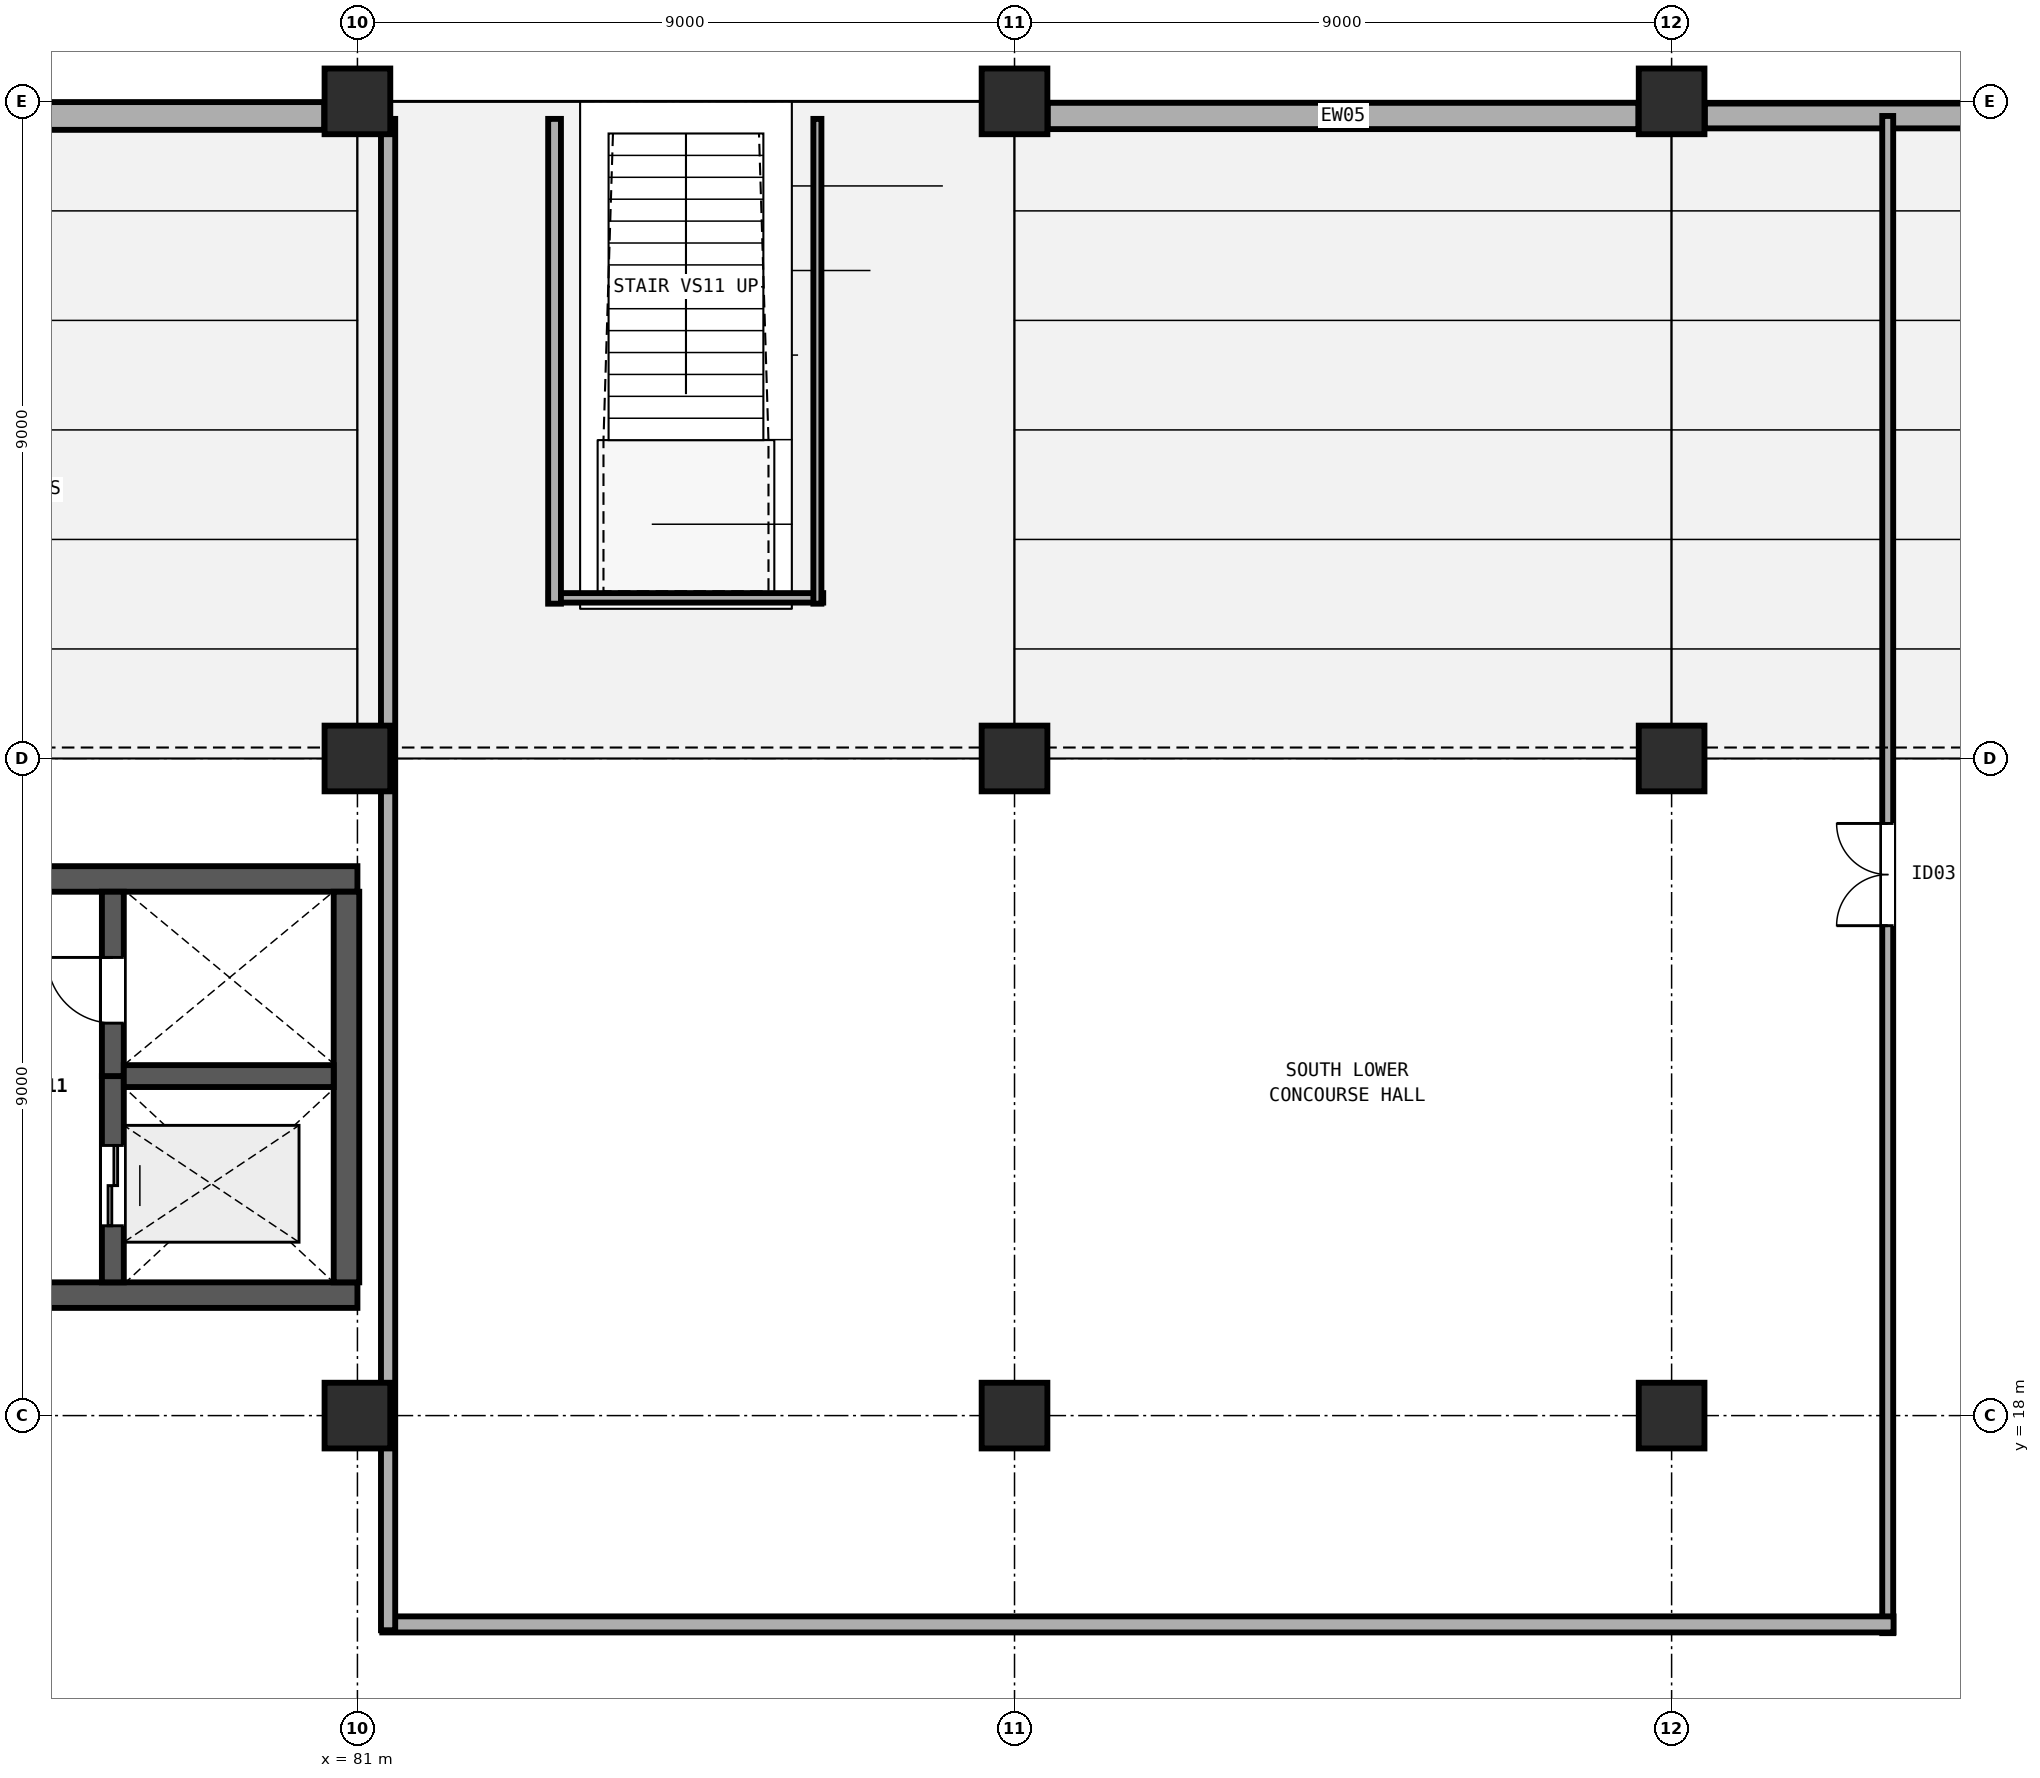
"""IFC4 building model, lengths in metres.
Left out: names, types, materials, properties, quantities, classifications, styles, units other than length and angle.
Written with IfcOpenShell. Run it as: python <this file> out.ifc"""

import sys

from ifc_helpers import new_model, si_unit, direction, frame, frame_2d, origin, origin_2d, place, context, subcontext, project, spatial, rectangle, extrude, element, fill, save


model = new_model("IFC4")
c1 = context("Model", 3, precision=1e-05, world=origin(), true_north=direction((0.0, 1.0)))
c2 = subcontext(c1, "Body", "Model", "MODEL_VIEW")
j1 = project(units=[si_unit("LENGTHUNIT", "METRE"), si_unit("PLANEANGLEUNIT", "RADIAN")], contexts=[c1])
p1 = place(None, origin())
s1 = spatial("IfcSite", under=j1, at=p1, CompositionType="ELEMENT")
p2 = place(p1, origin())
s2 = spatial("IfcBuilding", under=s1, at=p2, CompositionType="ELEMENT")
p3 = place(p2, frame((0.0, 0.0, 4.8)))
s3 = spatial("IfcBuildingStorey", under=s2, at=p3, CompositionType="ELEMENT", Elevation=4.8)
for number, where, z_axis, x_axis in (
    (1, (81.0, 18.0, 0.0), (0.0, 0.0, 1.0), (1.0, 0.0, 0.0)),
    (2, (81.0, 27.0, 0.0), (0.0, 0.0, 1.0), (1.0, 0.0, 0.0)),
    (3, (81.0, 36.0, 0.0), (0.0, 0.0, 1.0), (1.0, 0.0, 0.0)),
    (4, (90.0, 18.0, 0.0), (0.0, 0.0, 1.0), (1.0, 0.0, 0.0)),
    (5, (90.0, 27.0, 0.0), (0.0, 0.0, 1.0), (1.0, 0.0, 0.0)),
    (6, (90.0, 36.0, 0.0), (0.0, 0.0, 1.0), (1.0, 0.0, 0.0)),
    (7, (99.0, 18.0, 0.0), (0.0, 0.0, 1.0), (1.0, 0.0, 0.0)),
    (8, (99.0, 27.0, 0.0), (0.0, 0.0, 1.0), (1.0, 0.0, 0.0)),
    (9, (99.0, 36.0, 0.0), (0.0, 0.0, 1.0), (1.0, 0.0, 0.0)),
):
    element("IfcColumn", number, at=place(p3, frame(where, z_axis=z_axis, x_axis=x_axis)), inside=s3, PredefinedType="COLUMN", context=c2, shape_type="SweptSolid", body=[
        extrude(rectangle(XDim=0.9, YDim=0.9, at=origin_2d()), origin(), (0.0, 0.0, 1.0), 4.8),
    ])
p4 = place(p3, frame((63.0, 19.65, 0.0), z_axis=(0.0, 0.0, 1.0), x_axis=(1.0, 0.0, 0.0)))
e10 = element("IfcWall", 10, at=p4, inside=s3, PredefinedType="SHEAR", context=c2, shape_type="SweptSolid", body=[
    extrude(rectangle(XDim=18.0, YDim=0.35, at=frame_2d((9.0, 0.0))), origin(), (0.0, 0.0, 1.0), 4.52),
])
p5 = place(p4, frame((11.4, 0.0, 0.0)))
e11 = element("IfcOpeningElement", 11, at=p5, cuts=e10, PredefinedType="OPENING", context=c2, shape_type="SweptSolid", body=[
    extrude(rectangle(XDim=1.9, YDim=2.25, at=frame_2d((0.95, 1.125))), frame((0.0, 0.185, 0.0), z_axis=(0.0, -1.0, 0.0), x_axis=(1.0, 0.0, 0.0)), (0.0, 0.0, 1.0), 0.37),
])
p6 = place(p3, frame((81.0, 25.35, 0.0), z_axis=(0.0, 0.0, 1.0), x_axis=(-1.0, 0.0, 0.0)))
e12 = element("IfcWall", 12, at=p6, inside=s3, PredefinedType="SHEAR", context=c2, shape_type="SweptSolid", body=[
    extrude(rectangle(XDim=18.0, YDim=0.35, at=frame_2d((9.0, 0.0))), origin(), (0.0, 0.0, 1.0), 4.52),
])
p7 = place(p3, frame((80.85, 19.825, 0.0), z_axis=(0.0, 0.0, 1.0), x_axis=(0.0, 1.0, 0.0)))
e13 = element("IfcWall", 13, at=p7, inside=s3, PredefinedType="SHEAR", context=c2, shape_type="SweptSolid", body=[
    extrude(rectangle(XDim=5.35, YDim=0.35, at=frame_2d((2.675, 0.0))), origin(), (0.0, 0.0, 1.0), 4.52),
])
p8 = place(p3, frame((77.65, 19.825, 0.0), z_axis=(0.0, 0.0, 1.0), x_axis=(0.0, 1.0, 0.0)))
e14 = element("IfcWall", 14, at=p8, inside=s3, PredefinedType="SHEAR", context=c2, shape_type="SweptSolid", body=[
    extrude(rectangle(XDim=2.825, YDim=0.3, at=frame_2d((1.413, 0.0))), origin(), (0.0, 0.0, 1.0), 4.52),
])
p9 = place(p8, frame((0.775, 0.0, 0.0)))
e15 = element("IfcOpeningElement", 15, at=p9, cuts=e14, PredefinedType="OPENING", context=c2, shape_type="SweptSolid", body=[
    extrude(rectangle(XDim=1.1, YDim=2.1, at=frame_2d((0.55, 1.05))), frame((0.0, 0.16, 0.0), z_axis=(0.0, -1.0, 0.0), x_axis=(1.0, 0.0, 0.0)), (0.0, 0.0, 1.0), 0.32),
])
p10 = place(p3, frame((77.65, 22.65, 0.0), z_axis=(0.0, 0.0, 1.0), x_axis=(0.0, 1.0, 0.0)))
e16 = element("IfcWall", 16, at=p10, inside=s3, PredefinedType="SHEAR", context=c2, shape_type="SweptSolid", body=[
    extrude(rectangle(XDim=2.525, YDim=0.3, at=frame_2d((1.263, 0.0))), origin(), (0.0, 0.0, 1.0), 4.52),
])
p11 = place(p10, frame((0.725, 0.0, 0.0)))
e17 = element("IfcOpeningElement", 17, at=p11, cuts=e16, PredefinedType="OPENING", context=c2, shape_type="SweptSolid", body=[
    extrude(rectangle(XDim=0.9, YDim=2.1, at=frame_2d((0.45, 1.05))), frame((0.0, 0.16, 0.0), z_axis=(0.0, -1.0, 0.0), x_axis=(1.0, 0.0, 0.0)), (0.0, 0.0, 1.0), 0.32),
])
p12 = place(p3, frame((77.8, 22.65, 0.0), z_axis=(0.0, 0.0, 1.0), x_axis=(1.0, 0.0, 0.0)))
e18 = element("IfcWall", 18, at=p12, inside=s3, PredefinedType="SHEAR", context=c2, shape_type="SweptSolid", body=[
    extrude(rectangle(XDim=2.875, YDim=0.3, at=frame_2d((1.438, 0.0))), origin(), (0.0, 0.0, 1.0), 4.52),
])
p13 = place(p3, frame((72.455, 35.8, 0.0), z_axis=(0.0, 0.0, 1.0), x_axis=(1.0, 0.0, 0.0)))
e19 = element("IfcWall", 19, at=p13, inside=s3, PredefinedType="SOLIDWALL", context=c2, shape_type="SweptSolid", body=[
    extrude(rectangle(XDim=8.09, YDim=0.38, at=frame_2d((4.045, 0.0))), origin(), (0.0, 0.0, 1.0), 3.28),
])
p14 = place(p3, frame((90.455, 35.8, 0.0), z_axis=(0.0, 0.0, 1.0), x_axis=(1.0, 0.0, 0.0)))
e20 = element("IfcWall", 20, at=p14, inside=s3, PredefinedType="SOLIDWALL", context=c2, shape_type="SweptSolid", body=[
    extrude(rectangle(XDim=8.09, YDim=0.36, at=frame_2d((4.045, 0.0))), origin(), (0.0, 0.0, 1.0), 3.28),
])
p15 = place(p3, frame((99.455, 35.8, 0.0), z_axis=(0.0, 0.0, 1.0), x_axis=(1.0, 0.0, 0.0)))
e21 = element("IfcWall", 21, at=p15, inside=s3, PredefinedType="SOLIDWALL", context=c2, shape_type="SweptSolid", body=[
    extrude(rectangle(XDim=8.09, YDim=0.34, at=frame_2d((4.045, 0.0))), origin(), (0.0, 0.0, 1.0), 3.28),
])
p16 = place(p3, frame((101.96, 15.02, 0.0), z_axis=(0.0, 0.0, 1.0), x_axis=(0.0, 1.0, 0.0)))
e22 = element("IfcWall", 22, at=p16, inside=s3, PredefinedType="PARTITIONING", context=c2, shape_type="SweptSolid", body=[
    extrude(rectangle(XDim=20.78, YDim=0.15, at=frame_2d((10.39, 0.0))), origin(), (0.0, 0.0, 1.0), 3.28),
])
p17 = place(p16, frame((9.69, 0.0, 0.0)))
e23 = element("IfcOpeningElement", 23, at=p17, cuts=e22, PredefinedType="OPENING", context=c2, shape_type="SweptSolid", body=[
    extrude(rectangle(XDim=1.4, YDim=2.15, at=frame_2d((0.7, 1.075))), frame((0.0, 0.085, 0.0), z_axis=(0.0, -1.0, 0.0), x_axis=(1.0, 0.0, 0.0)), (0.0, 0.0, 1.0), 0.17),
])
p18 = place(p3, frame((83.62, 29.2, 0.0), z_axis=(0.0, 0.0, 1.0), x_axis=(1.0, 0.0, 0.0)))
e24 = element("IfcWall", 24, at=p18, inside=s3, PredefinedType="PARTITIONING", context=c2, shape_type="SweptSolid", body=[
    extrude(rectangle(XDim=3.76, YDim=0.13, at=frame_2d((1.88, 0.0))), origin(), (0.0, 0.0, 1.0), 3.28),
])
p19 = place(p3, frame((87.3, 29.12, 0.0), z_axis=(0.0, 0.0, 1.0), x_axis=(0.0, 1.0, 0.0)))
e25 = element("IfcWall", 25, at=p19, inside=s3, PredefinedType="PARTITIONING", context=c2, shape_type="SweptSolid", body=[
    extrude(rectangle(XDim=6.64, YDim=0.11, at=frame_2d((3.32, 0.0))), origin(), (0.0, 0.0, 1.0), 3.28),
])
p20 = place(p3, frame((102.04, 15.14, 0.0), z_axis=(0.0, 0.0, 1.0), x_axis=(-1.0, 0.0, 0.0)))
e26 = element("IfcWall", 26, at=p20, inside=s3, PredefinedType="PARTITIONING", context=c2, shape_type="SweptSolid", body=[
    extrude(rectangle(XDim=20.7, YDim=0.22, at=frame_2d((10.35, 0.0))), origin(), (0.0, 0.0, 1.0), 3.28),
])
p21 = place(p3, frame((81.42, 15.06, 0.0), z_axis=(0.0, 0.0, 1.0), x_axis=(0.0, 1.0, 0.0)))
e27 = element("IfcWall", 27, at=p21, inside=s3, PredefinedType="PARTITIONING", context=c2, shape_type="SweptSolid", body=[
    extrude(rectangle(XDim=20.7, YDim=0.195, at=frame_2d((10.35, 0.0))), origin(), (0.0, 0.0, 1.0), 3.28),
])
p22 = place(p3, frame((83.7, 35.76, 0.0), z_axis=(0.0, 0.0, 1.0), x_axis=(0.0, -1.0, 0.0)))
e28 = element("IfcWall", 28, at=p22, inside=s3, PredefinedType="PARTITIONING", context=c2, shape_type="SweptSolid", body=[
    extrude(rectangle(XDim=6.64, YDim=0.175, at=frame_2d((3.32, 0.0))), origin(), (0.0, 0.0, 1.0), 3.28),
])
p23 = place(p11, origin())
e29 = element("IfcDoor", 29, at=p23, inside=s3, OperationType="SINGLE_SWING_RIGHT", PredefinedType="DOOR", context=c2, shape_type="SweptSolid", body=[
    extrude(rectangle(XDim=0.9, YDim=2.1, at=frame_2d((0.45, 1.05))), frame((0.0, 0.025, 0.0), z_axis=(0.0, -1.0, 0.0), x_axis=(1.0, 0.0, 0.0)), (0.0, 0.0, 1.0), 0.05),
])
fill(e17, e29)
p24 = place(p9, origin())
e30 = element("IfcDoor", 30, at=p24, inside=s3, OperationType="DOUBLE_DOOR_SLIDING", PredefinedType="DOOR", context=c2, shape_type="SweptSolid", body=[
    extrude(rectangle(XDim=1.1, YDim=2.1, at=frame_2d((0.55, 1.05))), frame((0.0, 0.025, 0.0), z_axis=(0.0, -1.0, 0.0), x_axis=(1.0, 0.0, 0.0)), (0.0, 0.0, 1.0), 0.05),
])
fill(e15, e30)
p25 = place(p17, origin())
e31 = element("IfcDoor", 31, at=p25, inside=s3, OperationType="DOUBLE_DOOR_SINGLE_SWING", PredefinedType="DOOR", context=c2, shape_type="SweptSolid", body=[
    extrude(rectangle(XDim=1.4, YDim=2.15, at=frame_2d((0.7, 1.075))), frame((0.0, 0.025, 0.0), z_axis=(0.0, -1.0, 0.0), x_axis=(1.0, 0.0, 0.0)), (0.0, 0.0, 1.0), 0.05),
])
fill(e23, e31)
save(model, sys.argv[1])
